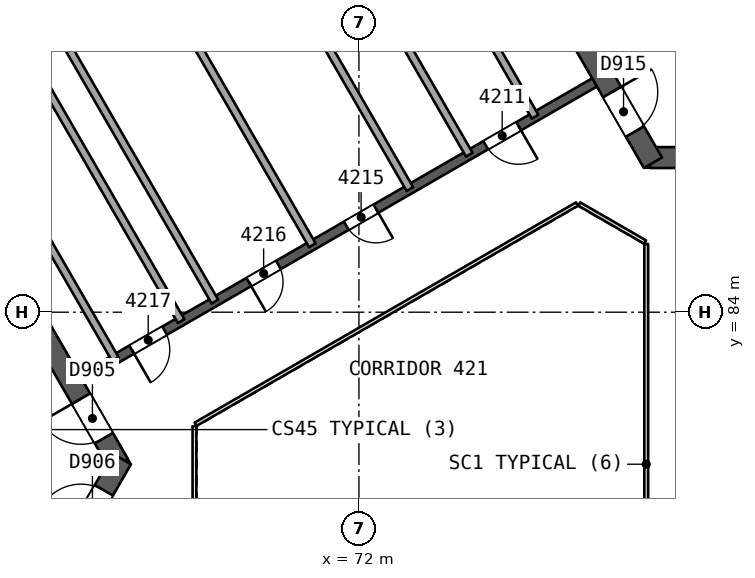
"""IFC4 building model, lengths in metres.
Left out: names, types, materials, properties, quantities, classifications, styles, units other than length and angle.
Written with IfcOpenShell. Run it as: python <this file> out.ifc"""

import sys

from ifc_helpers import new_model, si_unit, direction, frame, frame_2d, origin, place, context, subcontext, project, spatial, rectangle, extrude, element, fill, save


model = new_model("IFC4")
c1 = context("Model", 3, precision=1e-05, world=origin(), true_north=direction((0.0, 1.0)))
c2 = subcontext(c1, "Body", "Model", "MODEL_VIEW")
j1 = project(units=[si_unit("LENGTHUNIT", "METRE"), si_unit("PLANEANGLEUNIT", "RADIAN")], contexts=[c1])
p1 = place(None, origin())
s1 = spatial("IfcSite", under=j1, at=p1, CompositionType="ELEMENT")
p2 = place(p1, origin())
s2 = spatial("IfcBuilding", under=s1, at=p2, CompositionType="ELEMENT")
p3 = place(p2, frame((0.0, 0.0, 174.8)))
s3 = spatial("IfcBuildingStorey", under=s2, at=p3, CompositionType="ELEMENT", Elevation=174.8)
p4 = place(p3, frame((65.682, 80.0, 0.0), z_axis=(0.0, 0.0, 1.0), x_axis=(-0.500000202252, 0.866025287014, 0.0)))
e1 = element("IfcWall", 1, at=p4, inside=s3, PredefinedType="SHEAR", context=c2, shape_type="SweptSolid", body=[
    extrude(rectangle(XDim=10.221, YDim=0.55, at=frame_2d((5.111, 0.0))), origin(), (0.0, 0.0, 1.0), 3.7),
])
p5 = place(p4, frame((0.791, 0.0, 0.0)))
e2 = element("IfcOpeningElement", 2, at=p5, cuts=e1, PredefinedType="OPENING", context=c2, shape_type="SweptSolid", body=[
    extrude(rectangle(XDim=1.2, YDim=2.1, at=frame_2d((0.6, 1.05))), frame((0.0, 0.286, 0.0), z_axis=(0.0, -1.0, 0.0), x_axis=(1.0, 0.0, 0.0)), (0.0, 0.0, 1.0), 0.571),
])
p6 = place(p3, frame((60.709, 71.386, 0.0), z_axis=(0.0, 0.0, 1.0), x_axis=(0.500015938302, 0.866016201606, 0.0)))
e3 = element("IfcWall", 3, at=p6, inside=s3, PredefinedType="SHEAR", context=c2, shape_type="SweptSolid", body=[
    extrude(rectangle(XDim=10.105, YDim=0.55, at=frame_2d((5.053, 0.0))), origin(), (0.0, 0.0, 1.0), 3.7),
])
p7 = place(p6, frame((7.955, 0.0, 0.0)))
e4 = element("IfcOpeningElement", 4, at=p7, cuts=e3, PredefinedType="OPENING", context=c2, shape_type="SweptSolid", body=[
    extrude(rectangle(XDim=1.2, YDim=2.1, at=frame_2d((0.6, 1.05))), frame((0.0, 0.286, 0.0), z_axis=(0.0, -1.0, 0.0), x_axis=(1.0, 0.0, 0.0)), (0.0, 0.0, 1.0), 0.571),
])
p8 = place(p3, frame((79.659, 88.069, 0.0), z_axis=(0.0, 0.0, 1.0), x_axis=(1.0, 0.0, 0.0)))
e5 = element("IfcWall", 5, at=p8, inside=s3, PredefinedType="SHEAR", context=c2, shape_type="SweptSolid", body=[
    extrude(rectangle(XDim=10.221, YDim=0.55, at=frame_2d((5.111, 0.0))), origin(), (0.0, 0.0, 1.0), 3.7),
])
p9 = place(p8, frame((0.791, 0.0, 0.0)))
e6 = element("IfcOpeningElement", 6, at=p9, cuts=e5, PredefinedType="OPENING", context=c2, shape_type="SweptSolid", body=[
    extrude(rectangle(XDim=1.2, YDim=2.1, at=frame_2d((0.6, 1.05))), frame((0.0, 0.286, 0.0), z_axis=(0.0, -1.0, 0.0), x_axis=(1.0, 0.0, 0.0)), (0.0, 0.0, 1.0), 0.571),
])
p10 = place(p3, frame((74.686, 96.683, 0.0), z_axis=(0.0, 0.0, 1.0), x_axis=(0.499997818338, -0.866026663364, 0.0)))
e7 = element("IfcWall", 7, at=p10, inside=s3, PredefinedType="SHEAR", context=c2, shape_type="SweptSolid", body=[
    extrude(rectangle(XDim=10.105, YDim=0.55, at=frame_2d((5.052, 0.0))), origin(), (0.0, 0.0, 1.0), 3.7),
])
p11 = place(p10, frame((7.955, 0.0, 0.0)))
e8 = element("IfcOpeningElement", 8, at=p11, cuts=e7, PredefinedType="OPENING", context=c2, shape_type="SweptSolid", body=[
    extrude(rectangle(XDim=1.2, YDim=2.1, at=frame_2d((0.6, 1.05))), frame((0.0, 0.286, 0.0), z_axis=(0.0, -1.0, 0.0), x_axis=(1.0, 0.0, 0.0)), (0.0, 0.0, 1.0), 0.571),
])
p12 = place(p3, frame((78.2, 90.046, 0.0), z_axis=(0.0, 0.0, 1.0), x_axis=(-0.866026492143, -0.499998114903, 0.0)))
e9 = element("IfcWall", 9, at=p12, inside=s3, PredefinedType="SHEAR", context=c2, shape_type="SweptSolid", body=[
    extrude(rectangle(XDim=15.588, YDim=0.25, at=frame_2d((7.794, 0.0))), origin(), (0.0, 0.0, 1.0), 3.25),
])
p13 = place(p12, frame((2.306, 0.0, 0.0)))
e10 = element("IfcOpeningElement", 10, at=p13, cuts=e9, PredefinedType="OPENING", context=c2, shape_type="SweptSolid", body=[
    extrude(rectangle(XDim=1.0, YDim=2.1, at=frame_2d((0.5, 1.05))), frame((0.0, 0.135, 0.0), z_axis=(0.0, -1.0, 0.0), x_axis=(1.0, 0.0, 0.0)), (0.0, 0.0, 1.0), 0.271),
])
p14 = place(p12, frame((6.643, 0.0, 0.0)))
e11 = element("IfcOpeningElement", 11, at=p14, cuts=e9, PredefinedType="OPENING", context=c2, shape_type="SweptSolid", body=[
    extrude(rectangle(XDim=0.9, YDim=2.1, at=frame_2d((0.45, 1.05))), frame((0.0, 0.135, 0.0), z_axis=(0.0, -1.0, 0.0), x_axis=(1.0, 0.0, 0.0)), (0.0, 0.0, 1.0), 0.271),
])
p15 = place(p12, frame((9.604, 0.0, 0.0)))
e12 = element("IfcOpeningElement", 12, at=p15, cuts=e9, PredefinedType="OPENING", context=c2, shape_type="SweptSolid", body=[
    extrude(rectangle(XDim=0.9, YDim=2.1, at=frame_2d((0.45, 1.05))), frame((0.0, 0.135, 0.0), z_axis=(0.0, -1.0, 0.0), x_axis=(1.0, 0.0, 0.0)), (0.0, 0.0, 1.0), 0.271),
])
p16 = place(p12, frame((13.062, 0.0, 0.0)))
e13 = element("IfcOpeningElement", 13, at=p16, cuts=e9, PredefinedType="OPENING", context=c2, shape_type="SweptSolid", body=[
    extrude(rectangle(XDim=1.0, YDim=2.1, at=frame_2d((0.5, 1.05))), frame((0.0, 0.135, 0.0), z_axis=(0.0, -1.0, 0.0), x_axis=(1.0, 0.0, 0.0)), (0.0, 0.0, 1.0), 0.271),
])
p17 = place(p3, frame((74.904, 88.143, 0.0), z_axis=(0.0, 0.0, 1.0), x_axis=(-0.499990139034, 0.866031096941, 0.0)))
e14 = element("IfcWall", 14, at=p17, inside=s3, PredefinedType="PARTITIONING", context=c2, shape_type="SweptSolid", body=[
    extrude(rectangle(XDim=9.0, YDim=0.2, at=frame_2d((4.5, 0.0))), origin(), (0.0, 0.0, 1.0), 3.25),
])
p18 = place(p17, frame((4.05, 0.0, 0.0)))
e15 = element("IfcOpeningElement", 15, at=p18, cuts=e14, PredefinedType="OPENING", context=c2, shape_type="SweptSolid", body=[
    extrude(rectangle(XDim=0.9, YDim=2.1, at=frame_2d((0.45, 1.05))), frame((0.0, 0.11, 0.0), z_axis=(0.0, -1.0, 0.0), x_axis=(1.0, 0.0, 0.0)), (0.0, 0.0, 1.0), 0.221),
])
p19 = place(p3, frame((72.136, 96.937, 0.0), z_axis=(0.0, 0.0, 1.0), x_axis=(0.499990139034, -0.866031096941, 0.0)))
e16 = element("IfcWall", 16, at=p19, inside=s3, PredefinedType="PARTITIONING", context=c2, shape_type="SweptSolid", body=[
    extrude(rectangle(XDim=9.0, YDim=0.2, at=frame_2d((4.5, 0.0))), origin(), (0.0, 0.0, 1.0), 3.25),
])
for number, where, z_axis, x_axis in (
    (17, (67.676, 97.05, 0.0), (0.0, 0.0, 1.0), (0.5, -0.866, 0.0)),
    (18, (65.111, 95.569, 0.0), (0.0, 0.0, 1.0), (0.5, -0.866, 0.0)),
    (19, (62.546, 94.088, 0.0), (0.0, 0.0, 1.0), (0.5, -0.866, 0.0)),
):
    element("IfcWall", number, at=place(p3, frame(where, z_axis=z_axis, x_axis=x_axis)), inside=s3, PredefinedType="PARTITIONING", context=c2, shape_type="SweptSolid", body=[
        extrude(rectangle(XDim=11.328, YDim=0.2, at=frame_2d((5.664, 0.0))), origin(), (0.0, 0.0, 1.0), 3.25),
    ])
for number, where, z_axis, x_axis in (
    (20, (65.589, 82.765, 0.0), (0.0, 0.0, 1.0), (-0.5, 0.866, 0.0)),
    (21, (62.821, 91.559, 0.0), (0.0, 0.0, 1.0), (0.5, -0.866, 0.0)),
):
    element("IfcWall", number, at=place(p3, frame(where, z_axis=z_axis, x_axis=x_axis)), inside=s3, PredefinedType="PARTITIONING", context=c2, shape_type="SweptSolid", body=[
        extrude(rectangle(XDim=9.0, YDim=0.2, at=frame_2d((4.5, 0.0))), origin(), (0.0, 0.0, 1.0), 3.25),
    ])
p20 = place(p3, frame((42.58, 82.733, 0.0), z_axis=(0.0, 0.0, 1.0), x_axis=(0.866025382531, 0.500000036812, 0.0)))
e22 = element("IfcWall", 22, at=p20, inside=s3, PredefinedType="SOLIDWALL", context=c2, shape_type="SweptSolid", body=[
    extrude(rectangle(XDim=53.42, YDim=0.3, at=frame_2d((26.71, 0.0))), origin(), (0.0, 0.0, 1.0), 3.25),
])
p21 = place(p20, frame((30.499, 0.0, 0.0)))
e23 = element("IfcOpeningElement", 23, at=p21, cuts=e22, PredefinedType="OPENING", context=c2, shape_type="SweptSolid", body=[
    extrude(rectangle(XDim=2.4, YDim=2.4, at=frame_2d((1.2, 1.2))), frame((0.0, 0.161, 0.0), z_axis=(0.0, -1.0, 0.0), x_axis=(1.0, 0.0, 0.0)), (0.0, 0.0, 1.0), 0.321),
])
p22 = place(p20, frame((41.52, 0.0, 0.0)))
e24 = element("IfcOpeningElement", 24, at=p22, cuts=e22, PredefinedType="OPENING", context=c2, shape_type="SweptSolid", body=[
    extrude(rectangle(XDim=2.4, YDim=2.4, at=frame_2d((1.2, 1.2))), frame((0.0, 0.161, 0.0), z_axis=(0.0, -1.0, 0.0), x_axis=(1.0, 0.0, 0.0)), (0.0, 0.0, 1.0), 0.321),
])
p23 = place(p20, frame((19.742, 0.0, 0.0)))
e25 = element("IfcOpeningElement", 25, at=p23, cuts=e22, PredefinedType="OPENING", context=c2, shape_type="SweptSolid", body=[
    extrude(rectangle(XDim=2.4, YDim=2.4, at=frame_2d((1.2, 1.2))), frame((0.0, 0.161, 0.0), z_axis=(0.0, -1.0, 0.0), x_axis=(1.0, 0.0, 0.0)), (0.0, 0.0, 1.0), 0.321),
])
p24 = place(p20, frame((9.507, 0.0, 0.0)))
e26 = element("IfcOpeningElement", 26, at=p24, cuts=e22, PredefinedType="OPENING", context=c2, shape_type="SweptSolid", body=[
    extrude(rectangle(XDim=2.4, YDim=2.4, at=frame_2d((1.2, 1.2))), frame((0.0, 0.161, 0.0), z_axis=(0.0, -1.0, 0.0), x_axis=(1.0, 0.0, 0.0)), (0.0, 0.0, 1.0), 0.321),
])
p25 = place(p20, frame((26.512, 0.0, 0.9)))
e27 = element("IfcOpeningElement", 27, at=p25, cuts=e22, PredefinedType="OPENING", context=c2, shape_type="SweptSolid", body=[
    extrude(rectangle(XDim=1.8, YDim=1.5, at=frame_2d((0.9, 0.75))), frame((0.0, 0.161, 0.0), z_axis=(0.0, -1.0, 0.0), x_axis=(1.0, 0.0, 0.0)), (0.0, 0.0, 1.0), 0.321),
])
p26 = place(p20, frame((23.55, 0.0, 0.9)))
e28 = element("IfcOpeningElement", 28, at=p26, cuts=e22, PredefinedType="OPENING", context=c2, shape_type="SweptSolid", body=[
    extrude(rectangle(XDim=1.8, YDim=1.5, at=frame_2d((0.9, 0.75))), frame((0.0, 0.161, 0.0), z_axis=(0.0, -1.0, 0.0), x_axis=(1.0, 0.0, 0.0)), (0.0, 0.0, 1.0), 0.321),
])
p27 = place(p3, frame((86.77, 89.486, 0.0), z_axis=(0.0, 0.0, 1.0), x_axis=(-0.86601811187, 0.500012629753, 0.0)))
e29 = element("IfcWall", 29, at=p27, inside=s3, PredefinedType="SOLIDWALL", context=c2, shape_type="SweptSolid", body=[
    extrude(rectangle(XDim=10.9, YDim=0.2, at=frame_2d((5.45, 0.0))), origin(), (0.0, 0.0, 1.0), 3.25),
])
p28 = place(p27, frame((0.575, 0.0, 0.0)))
e30 = element("IfcOpeningElement", 30, at=p28, cuts=e29, PredefinedType="OPENING", context=c2, shape_type="SweptSolid", body=[
    extrude(rectangle(XDim=1.1, YDim=2.1, at=frame_2d((0.55, 1.05))), frame((0.0, 0.11, 0.0), z_axis=(0.0, -1.0, 0.0), x_axis=(1.0, 0.0, 0.0)), (0.0, 0.0, 1.0), 0.221),
])
p29 = place(p27, frame((2.825, 0.0, 0.0)))
e31 = element("IfcOpeningElement", 31, at=p29, cuts=e29, PredefinedType="OPENING", context=c2, shape_type="SweptSolid", body=[
    extrude(rectangle(XDim=1.1, YDim=2.1, at=frame_2d((0.55, 1.05))), frame((0.0, 0.11, 0.0), z_axis=(0.0, -1.0, 0.0), x_axis=(1.0, 0.0, 0.0)), (0.0, 0.0, 1.0), 0.221),
])
p30 = place(p27, frame((5.075, 0.0, 0.0)))
e32 = element("IfcOpeningElement", 32, at=p30, cuts=e29, PredefinedType="OPENING", context=c2, shape_type="SweptSolid", body=[
    extrude(rectangle(XDim=1.1, YDim=2.1, at=frame_2d((0.55, 1.05))), frame((0.0, 0.11, 0.0), z_axis=(0.0, -1.0, 0.0), x_axis=(1.0, 0.0, 0.0)), (0.0, 0.0, 1.0), 0.221),
])
p31 = place(p27, frame((7.325, 0.0, 0.0)))
e33 = element("IfcOpeningElement", 33, at=p31, cuts=e29, PredefinedType="OPENING", context=c2, shape_type="SweptSolid", body=[
    extrude(rectangle(XDim=1.1, YDim=2.1, at=frame_2d((0.55, 1.05))), frame((0.0, 0.11, 0.0), z_axis=(0.0, -1.0, 0.0), x_axis=(1.0, 0.0, 0.0)), (0.0, 0.0, 1.0), 0.221),
])
p32 = place(p3, frame((89.33, 90.872, 0.0), z_axis=(0.0, 0.0, 1.0), x_axis=(-0.866027589512, 0.49999621419, 0.0)))
e34 = element("IfcWall", 34, at=p32, inside=s3, PredefinedType="SOLIDWALL", context=c2, shape_type="SweptSolid", body=[
    extrude(rectangle(XDim=10.524, YDim=0.2, at=frame_2d((5.262, 0.0))), origin(), (0.0, 0.0, 1.0), 3.25),
])
p33 = place(p32, frame((0.312, 0.0, 0.0)))
e35 = element("IfcOpeningElement", 35, at=p33, cuts=e34, PredefinedType="OPENING", context=c2, shape_type="SweptSolid", body=[
    extrude(rectangle(XDim=0.9, YDim=2.1, at=frame_2d((0.45, 1.05))), frame((0.0, 0.11, 0.0), z_axis=(0.0, -1.0, 0.0), x_axis=(1.0, 0.0, 0.0)), (0.0, 0.0, 1.0), 0.221),
])
p34 = place(p3, frame((79.56, 74.206, 0.0), z_axis=(0.0, 0.0, 1.0), x_axis=(0.0, 1.0, 0.0)))
e36 = element("IfcWall", 36, at=p34, inside=s3, PredefinedType="PARTITIONING", context=c2, shape_type="SweptSolid", body=[
    extrude(rectangle(XDim=11.588, YDim=0.1, at=frame_2d((5.794, 0.0))), origin(), (0.0, 0.0, 1.0), 3.25),
])
p35 = place(p3, frame((79.53, 85.846, 0.0), z_axis=(0.0, 0.0, 1.0), x_axis=(-0.866041268327, 0.499972520799, 0.0)))
e37 = element("IfcWall", 37, at=p35, inside=s3, PredefinedType="PARTITIONING", context=c2, shape_type="SweptSolid", body=[
    extrude(rectangle(XDim=2.0, YDim=0.1, at=frame_2d((1.0, 0.0))), origin(), (0.0, 0.0, 1.0), 3.25),
])
p36 = place(p3, frame((77.738, 86.846, 0.0), z_axis=(0.0, 0.0, 1.0), x_axis=(-0.866026658274, -0.499997827154, 0.0)))
e38 = element("IfcWall", 38, at=p36, inside=s3, PredefinedType="PARTITIONING", context=c2, shape_type="SweptSolid", body=[
    extrude(rectangle(XDim=11.588, YDim=0.1, at=frame_2d((5.794, 0.0))), origin(), (0.0, 0.0, 1.0), 3.25),
])
p37 = place(p3, frame((67.672, 81.0, 0.0), z_axis=(0.0, 0.0, 1.0), x_axis=(0.0, -1.0, 0.0)))
e39 = element("IfcWall", 39, at=p37, inside=s3, PredefinedType="PARTITIONING", context=c2, shape_type="SweptSolid", body=[
    extrude(rectangle(XDim=2.0, YDim=0.1, at=frame_2d((1.0, 0.0))), origin(), (0.0, 0.0, 1.0), 3.25),
])
p38 = place(p13, origin())
e40 = element("IfcDoor", 40, at=p38, inside=s3, OperationType="SINGLE_SWING_LEFT", PredefinedType="NOTDEFINED", context=c2, shape_type="SweptSolid", body=[
    extrude(rectangle(XDim=1.0, YDim=2.1, at=frame_2d((0.5, 1.05))), frame((0.0, 0.025, 0.0), z_axis=(0.0, -1.0, 0.0), x_axis=(1.0, 0.0, 0.0)), (0.0, 0.0, 1.0), 0.05),
])
fill(e10, e40)
p39 = place(p14, origin())
e41 = element("IfcDoor", 41, at=p39, inside=s3, OperationType="SINGLE_SWING_LEFT", PredefinedType="NOTDEFINED", context=c2, shape_type="SweptSolid", body=[
    extrude(rectangle(XDim=0.9, YDim=2.1, at=frame_2d((0.45, 1.05))), frame((0.0, 0.025, 0.0), z_axis=(0.0, -1.0, 0.0), x_axis=(1.0, 0.0, 0.0)), (0.0, 0.0, 1.0), 0.05),
])
fill(e11, e41)
p40 = place(p15, origin())
e42 = element("IfcDoor", 42, at=p40, inside=s3, OperationType="SINGLE_SWING_RIGHT", PredefinedType="NOTDEFINED", context=c2, shape_type="SweptSolid", body=[
    extrude(rectangle(XDim=0.9, YDim=2.1, at=frame_2d((0.45, 1.05))), frame((0.0, 0.025, 0.0), z_axis=(0.0, -1.0, 0.0), x_axis=(1.0, 0.0, 0.0)), (0.0, 0.0, 1.0), 0.05),
])
fill(e12, e42)
p41 = place(p16, origin())
e43 = element("IfcDoor", 43, at=p41, inside=s3, OperationType="SINGLE_SWING_RIGHT", PredefinedType="NOTDEFINED", context=c2, shape_type="SweptSolid", body=[
    extrude(rectangle(XDim=1.0, YDim=2.1, at=frame_2d((0.5, 1.05))), frame((0.0, 0.025, 0.0), z_axis=(0.0, -1.0, 0.0), x_axis=(1.0, 0.0, 0.0)), (0.0, 0.0, 1.0), 0.05),
])
fill(e13, e43)
p42 = place(p5, origin())
e44 = element("IfcDoor", 44, at=p42, inside=s3, OperationType="SINGLE_SWING_RIGHT", PredefinedType="NOTDEFINED", context=c2, shape_type="SweptSolid", body=[
    extrude(rectangle(XDim=1.2, YDim=2.1, at=frame_2d((0.6, 1.05))), frame((0.0, 0.025, 0.0), z_axis=(0.0, -1.0, 0.0), x_axis=(1.0, 0.0, 0.0)), (0.0, 0.0, 1.0), 0.05),
])
fill(e2, e44)
p43 = place(p7, origin())
e45 = element("IfcDoor", 45, at=p43, inside=s3, OperationType="SINGLE_SWING_LEFT", PredefinedType="NOTDEFINED", context=c2, shape_type="SweptSolid", body=[
    extrude(rectangle(XDim=1.2, YDim=2.1, at=frame_2d((0.6, 1.05))), frame((0.0, 0.025, 0.0), z_axis=(0.0, -1.0, 0.0), x_axis=(1.0, 0.0, 0.0)), (0.0, 0.0, 1.0), 0.05),
])
fill(e4, e45)
p44 = place(p11, origin())
e46 = element("IfcDoor", 46, at=p44, inside=s3, OperationType="SINGLE_SWING_LEFT", PredefinedType="NOTDEFINED", context=c2, shape_type="SweptSolid", body=[
    extrude(rectangle(XDim=1.2, YDim=2.1, at=frame_2d((0.6, 1.05))), frame((0.0, 0.025, 0.0), z_axis=(0.0, -1.0, 0.0), x_axis=(1.0, 0.0, 0.0)), (0.0, 0.0, 1.0), 0.05),
])
fill(e8, e46)
save(model, sys.argv[1])
